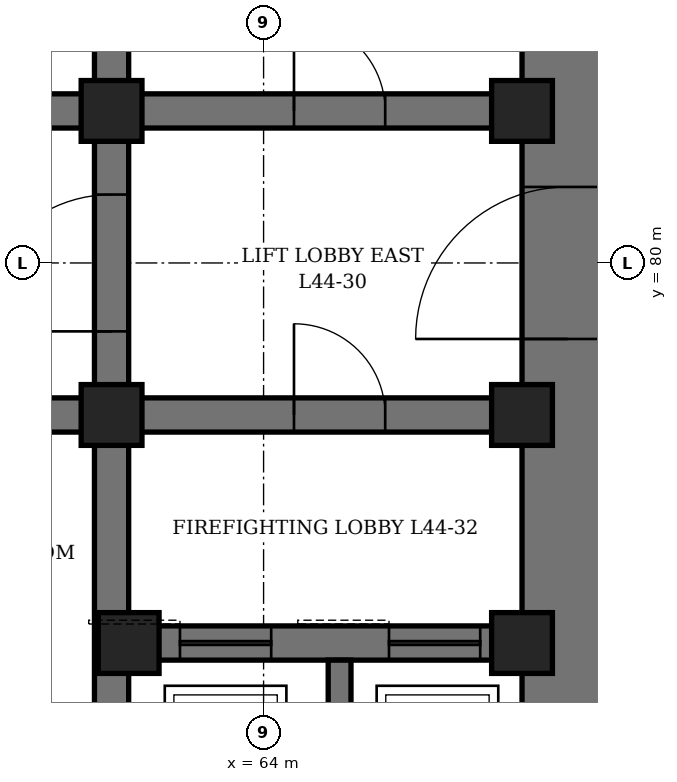
"""IFC4 building model, lengths in metres.
Left out: names, types, materials, properties, quantities, classifications, styles, units other than length and angle.
Written with IfcOpenShell. Run it as: python <this file> out.ifc"""

import sys

from ifc_helpers import new_model, si_unit, direction, frame, frame_2d, origin, origin_2d, place, context, subcontext, project, spatial, rectangle, hollow_rectangle, extrude, element, fill, save


model = new_model("IFC4")
c1 = context("Model", 3, precision=1e-05, world=origin(), true_north=direction((0.0, 1.0)))
c2 = subcontext(c1, "Body", "Model", "MODEL_VIEW")
j1 = project(units=[si_unit("LENGTHUNIT", "METRE"), si_unit("PLANEANGLEUNIT", "RADIAN")], contexts=[c1])
p1 = place(None, origin())
s1 = spatial("IfcSite", under=j1, at=p1, CompositionType="ELEMENT")
p2 = place(p1, origin())
s2 = spatial("IfcBuilding", under=s1, at=p2, CompositionType="ELEMENT")
p3 = place(p2, frame((0.0, 0.0, 198.1)))
s3 = spatial("IfcBuildingStorey", under=s2, at=p3, CompositionType="ELEMENT", Elevation=198.1)
p4 = place(p3, frame((68.0, 70.4, 0.0), z_axis=(0.0, 0.0, 1.0), x_axis=(0.0, 1.0, 0.0)))
e1 = element("IfcWall", 1, at=p4, inside=s3, PredefinedType="SHEAR", context=c2, shape_type="SweptSolid", body=[
    extrude(rectangle(XDim=19.2, YDim=1.2, at=frame_2d((9.6, 0.0))), origin(), (0.0, 0.0, 1.0), 4.2),
])
p5 = place(p4, frame((8.6, 0.0, 0.0)))
e2 = element("IfcOpeningElement", 2, at=p5, cuts=e1, PredefinedType="OPENING", context=c2, shape_type="SweptSolid", body=[
    extrude(rectangle(XDim=2.0, YDim=2.4, at=frame_2d((1.0, 1.2))), frame((0.0, 0.61, 0.0), z_axis=(0.0, -1.0, 0.0), x_axis=(1.0, 0.0, 0.0)), (0.0, 0.0, 1.0), 1.22),
])
p6 = place(p3, frame((62.0, 71.6, 0.0), z_axis=(0.0, 0.0, 1.0), x_axis=(0.0, 1.0, 0.0)))
e3 = element("IfcWall", 3, at=p6, inside=s3, PredefinedType="SHEAR", context=c2, shape_type="SweptSolid", body=[
    extrude(rectangle(XDim=16.8, YDim=0.45, at=frame_2d((8.4, 0.0))), origin(), (0.0, 0.0, 1.0), 4.2),
])
p7 = place(p6, frame((7.5, 0.0, 0.0)))
e4 = element("IfcOpeningElement", 4, at=p7, cuts=e3, PredefinedType="OPENING", context=c2, shape_type="SweptSolid", body=[
    extrude(rectangle(XDim=1.8, YDim=2.4, at=frame_2d((0.9, 1.2))), frame((0.0, 0.235, 0.0), z_axis=(0.0, -1.0, 0.0), x_axis=(1.0, 0.0, 0.0)), (0.0, 0.0, 1.0), 0.47),
])
p8 = place(p3, frame((62.225, 75.0, 0.0), z_axis=(0.0, 0.0, 1.0), x_axis=(1.0, 0.0, 0.0)))
e5 = element("IfcWall", 5, at=p8, inside=s3, PredefinedType="SHEAR", context=c2, shape_type="SweptSolid", body=[
    extrude(rectangle(XDim=5.175, YDim=0.45, at=frame_2d((2.587, 0.0))), origin(), (0.0, 0.0, 1.0), 4.2),
])
p9 = place(p8, frame((0.675, 0.0, 0.0)))
e6 = element("IfcOpeningElement", 6, at=p9, cuts=e5, PredefinedType="OPENING", context=c2, shape_type="SweptSolid", body=[
    extrude(rectangle(XDim=1.2, YDim=2.2, at=frame_2d((0.6, 1.1))), frame((0.0, 0.235, 0.0), z_axis=(0.0, -1.0, 0.0), x_axis=(1.0, 0.0, 0.0)), (0.0, 0.0, 1.0), 0.47),
])
p10 = place(p8, frame((3.425, 0.0, 0.0)))
e7 = element("IfcOpeningElement", 7, at=p10, cuts=e5, PredefinedType="OPENING", context=c2, shape_type="SweptSolid", body=[
    extrude(rectangle(XDim=1.2, YDim=2.2, at=frame_2d((0.6, 1.1))), frame((0.0, 0.235, 0.0), z_axis=(0.0, -1.0, 0.0), x_axis=(1.0, 0.0, 0.0)), (0.0, 0.0, 1.0), 0.47),
])
p11 = place(p3, frame((62.225, 78.0, 0.0), z_axis=(0.0, 0.0, 1.0), x_axis=(1.0, 0.0, 0.0)))
e8 = element("IfcWall", 8, at=p11, inside=s3, PredefinedType="SHEAR", context=c2, shape_type="SweptSolid", body=[
    extrude(rectangle(XDim=5.175, YDim=0.45, at=frame_2d((2.587, 0.0))), origin(), (0.0, 0.0, 1.0), 4.2),
])
p12 = place(p11, frame((2.175, 0.0, 0.0)))
e9 = element("IfcOpeningElement", 9, at=p12, cuts=e8, PredefinedType="OPENING", context=c2, shape_type="SweptSolid", body=[
    extrude(rectangle(XDim=1.2, YDim=2.1, at=frame_2d((0.6, 1.05))), frame((0.0, 0.235, 0.0), z_axis=(0.0, -1.0, 0.0), x_axis=(1.0, 0.0, 0.0)), (0.0, 0.0, 1.0), 0.47),
])
p13 = place(p3, frame((62.225, 82.0, 0.0), z_axis=(0.0, 0.0, 1.0), x_axis=(1.0, 0.0, 0.0)))
e10 = element("IfcWall", 10, at=p13, inside=s3, PredefinedType="SHEAR", context=c2, shape_type="SweptSolid", body=[
    extrude(rectangle(XDim=5.175, YDim=0.45, at=frame_2d((2.587, 0.0))), origin(), (0.0, 0.0, 1.0), 4.2),
])
p14 = place(p13, frame((2.175, 0.0, 0.0)))
e11 = element("IfcOpeningElement", 11, at=p14, cuts=e10, PredefinedType="OPENING", context=c2, shape_type="SweptSolid", body=[
    extrude(rectangle(XDim=1.2, YDim=2.1, at=frame_2d((0.6, 1.05))), frame((0.0, 0.235, 0.0), z_axis=(0.0, -1.0, 0.0), x_axis=(1.0, 0.0, 0.0)), (0.0, 0.0, 1.0), 0.47),
])
p15 = place(p3, frame((50.225, 78.0, 0.0), z_axis=(0.0, 0.0, 1.0), x_axis=(1.0, 0.0, 0.0)))
e12 = element("IfcWall", 12, at=p15, inside=s3, PredefinedType="SHEAR", context=c2, shape_type="SweptSolid", body=[
    extrude(rectangle(XDim=11.55, YDim=0.45, at=frame_2d((5.775, 0.0))), origin(), (0.0, 0.0, 1.0), 4.2),
])
p16 = place(p15, frame((0.825, 0.0, 0.0)))
e13 = element("IfcOpeningElement", 13, at=p16, cuts=e12, PredefinedType="OPENING", context=c2, shape_type="SweptSolid", body=[
    extrude(rectangle(XDim=0.9, YDim=2.1, at=frame_2d((0.45, 1.05))), frame((0.0, 0.235, 0.0), z_axis=(0.0, -1.0, 0.0), x_axis=(1.0, 0.0, 0.0)), (0.0, 0.0, 1.0), 0.47),
])
p17 = place(p15, frame((3.825, 0.0, 0.0)))
e14 = element("IfcOpeningElement", 14, at=p17, cuts=e12, PredefinedType="OPENING", context=c2, shape_type="SweptSolid", body=[
    extrude(rectangle(XDim=0.9, YDim=2.1, at=frame_2d((0.45, 1.05))), frame((0.0, 0.235, 0.0), z_axis=(0.0, -1.0, 0.0), x_axis=(1.0, 0.0, 0.0)), (0.0, 0.0, 1.0), 0.47),
])
p18 = place(p15, frame((6.825, 0.0, 0.0)))
e15 = element("IfcOpeningElement", 15, at=p18, cuts=e12, PredefinedType="OPENING", context=c2, shape_type="SweptSolid", body=[
    extrude(rectangle(XDim=0.9, YDim=2.1, at=frame_2d((0.45, 1.05))), frame((0.0, 0.235, 0.0), z_axis=(0.0, -1.0, 0.0), x_axis=(1.0, 0.0, 0.0)), (0.0, 0.0, 1.0), 0.47),
])
p19 = place(p15, frame((9.825, 0.0, 0.0)))
e16 = element("IfcOpeningElement", 16, at=p19, cuts=e12, PredefinedType="OPENING", context=c2, shape_type="SweptSolid", body=[
    extrude(rectangle(XDim=0.9, YDim=2.1, at=frame_2d((0.45, 1.05))), frame((0.0, 0.235, 0.0), z_axis=(0.0, -1.0, 0.0), x_axis=(1.0, 0.0, 0.0)), (0.0, 0.0, 1.0), 0.47),
])
p20 = place(p3, frame((50.225, 82.0, 0.0), z_axis=(0.0, 0.0, 1.0), x_axis=(1.0, 0.0, 0.0)))
e17 = element("IfcWall", 17, at=p20, inside=s3, PredefinedType="SHEAR", context=c2, shape_type="SweptSolid", body=[
    extrude(rectangle(XDim=11.55, YDim=0.45, at=frame_2d((5.775, 0.0))), origin(), (0.0, 0.0, 1.0), 4.2),
])
p21 = place(p20, frame((0.825, 0.0, 0.0)))
e18 = element("IfcOpeningElement", 18, at=p21, cuts=e17, PredefinedType="OPENING", context=c2, shape_type="SweptSolid", body=[
    extrude(rectangle(XDim=0.9, YDim=2.1, at=frame_2d((0.45, 1.05))), frame((0.0, 0.235, 0.0), z_axis=(0.0, -1.0, 0.0), x_axis=(1.0, 0.0, 0.0)), (0.0, 0.0, 1.0), 0.47),
])
p22 = place(p20, frame((3.825, 0.0, 0.0)))
e19 = element("IfcOpeningElement", 19, at=p22, cuts=e17, PredefinedType="OPENING", context=c2, shape_type="SweptSolid", body=[
    extrude(rectangle(XDim=0.9, YDim=2.1, at=frame_2d((0.45, 1.05))), frame((0.0, 0.235, 0.0), z_axis=(0.0, -1.0, 0.0), x_axis=(1.0, 0.0, 0.0)), (0.0, 0.0, 1.0), 0.47),
])
p23 = place(p20, frame((6.825, 0.0, 0.0)))
e20 = element("IfcOpeningElement", 20, at=p23, cuts=e17, PredefinedType="OPENING", context=c2, shape_type="SweptSolid", body=[
    extrude(rectangle(XDim=0.9, YDim=2.1, at=frame_2d((0.45, 1.05))), frame((0.0, 0.235, 0.0), z_axis=(0.0, -1.0, 0.0), x_axis=(1.0, 0.0, 0.0)), (0.0, 0.0, 1.0), 0.47),
])
p24 = place(p20, frame((9.825, 0.0, 0.0)))
e21 = element("IfcOpeningElement", 21, at=p24, cuts=e17, PredefinedType="OPENING", context=c2, shape_type="SweptSolid", body=[
    extrude(rectangle(XDim=0.9, YDim=2.1, at=frame_2d((0.45, 1.05))), frame((0.0, 0.235, 0.0), z_axis=(0.0, -1.0, 0.0), x_axis=(1.0, 0.0, 0.0)), (0.0, 0.0, 1.0), 0.47),
])
p25 = place(p3, frame((65.0, 71.6, 0.0), z_axis=(0.0, 0.0, 1.0), x_axis=(0.0, 1.0, 0.0)))
e22 = element("IfcWall", 22, at=p25, inside=s3, PredefinedType="SHEAR", context=c2, shape_type="SweptSolid", body=[
    extrude(rectangle(XDim=3.175, YDim=0.3, at=frame_2d((1.587, 0.0))), origin(), (0.0, 0.0, 1.0), 4.2),
])
for number, where, z_axis, x_axis in (
    (23, (62.0, 78.0, 0.0), (0.0, 0.0, 1.0), (1.0, 0.0, 0.0)),
    (24, (62.0, 82.0, 0.0), (0.0, 0.0, 1.0), (1.0, 0.0, 0.0)),
    (25, (62.225, 75.0, 0.0), (0.0, 0.0, 1.0), (1.0, 0.0, 0.0)),
    (26, (67.4, 75.0, 0.0), (0.0, 0.0, 1.0), (1.0, 0.0, 0.0)),
    (27, (67.4, 78.0, 0.0), (0.0, 0.0, 1.0), (1.0, 0.0, 0.0)),
    (28, (67.4, 82.0, 0.0), (0.0, 0.0, 1.0), (1.0, 0.0, 0.0)),
):
    element("IfcColumn", number, at=place(p3, frame(where, z_axis=z_axis, x_axis=x_axis)), inside=s3, PredefinedType="COLUMN", context=c2, shape_type="SweptSolid", body=[
        extrude(hollow_rectangle(XDim=0.8, YDim=0.8, WallThickness=0.1, at=origin_2d()), origin(), (0.0, 0.0, 1.0), 4.2),
    ])
p26 = place(p14, origin())
e29 = element("IfcDoor", 29, at=p26, inside=s3, OperationType="SINGLE_SWING_LEFT", PredefinedType="DOOR", context=c2, shape_type="SweptSolid", body=[
    extrude(rectangle(XDim=1.2, YDim=2.1, at=frame_2d((0.6, 1.05))), frame((0.0, 0.225, 0.0), z_axis=(0.0, -1.0, 0.0), x_axis=(1.0, 0.0, 0.0)), (0.0, 0.0, 1.0), 0.449),
])
fill(e11, e29)
p27 = place(p5, origin())
e30 = element("IfcDoor", 30, at=p27, inside=s3, OperationType="DOUBLE_DOOR_SINGLE_SWING", PredefinedType="DOOR", context=c2, shape_type="SweptSolid", body=[
    extrude(rectangle(XDim=2.0, YDim=2.4, at=frame_2d((1.0, 1.2))), frame((0.0, 0.35, 0.0), z_axis=(0.0, -1.0, 0.0), x_axis=(1.0, 0.0, 0.0)), (0.0, 0.0, 1.0), 0.7),
])
fill(e2, e30)
p28 = place(p7, origin())
e31 = element("IfcDoor", 31, at=p28, inside=s3, OperationType="DOUBLE_DOOR_SINGLE_SWING", PredefinedType="DOOR", context=c2, shape_type="SweptSolid", body=[
    extrude(rectangle(XDim=1.8, YDim=2.4, at=frame_2d((0.9, 1.2))), frame((0.0, 0.225, 0.0), z_axis=(0.0, -1.0, 0.0), x_axis=(1.0, 0.0, 0.0)), (0.0, 0.0, 1.0), 0.449),
])
fill(e4, e31)
p29 = place(p12, origin())
e32 = element("IfcDoor", 32, at=p29, inside=s3, OperationType="SINGLE_SWING_RIGHT", PredefinedType="DOOR", context=c2, shape_type="SweptSolid", body=[
    extrude(rectangle(XDim=1.2, YDim=2.1, at=frame_2d((0.6, 1.05))), frame((0.0, 0.225, 0.0), z_axis=(0.0, -1.0, 0.0), x_axis=(1.0, 0.0, 0.0)), (0.0, 0.0, 1.0), 0.449),
])
fill(e9, e32)
p30 = place(p9, origin())
e33 = element("IfcDoor", 33, at=p30, inside=s3, OperationType="SLIDING_TO_LEFT", PredefinedType="DOOR", context=c2, shape_type="SweptSolid", body=[
    extrude(rectangle(XDim=1.2, YDim=2.2, at=frame_2d((0.6, 1.1))), frame((0.0, 0.225, 0.0), z_axis=(0.0, -1.0, 0.0), x_axis=(1.0, 0.0, 0.0)), (0.0, 0.0, 1.0), 0.449),
])
fill(e6, e33)
p31 = place(p10, origin())
e34 = element("IfcDoor", 34, at=p31, inside=s3, OperationType="SLIDING_TO_LEFT", PredefinedType="DOOR", context=c2, shape_type="SweptSolid", body=[
    extrude(rectangle(XDim=1.2, YDim=2.2, at=frame_2d((0.6, 1.1))), frame((0.0, 0.225, 0.0), z_axis=(0.0, -1.0, 0.0), x_axis=(1.0, 0.0, 0.0)), (0.0, 0.0, 1.0), 0.449),
])
fill(e7, e34)
save(model, sys.argv[1])
